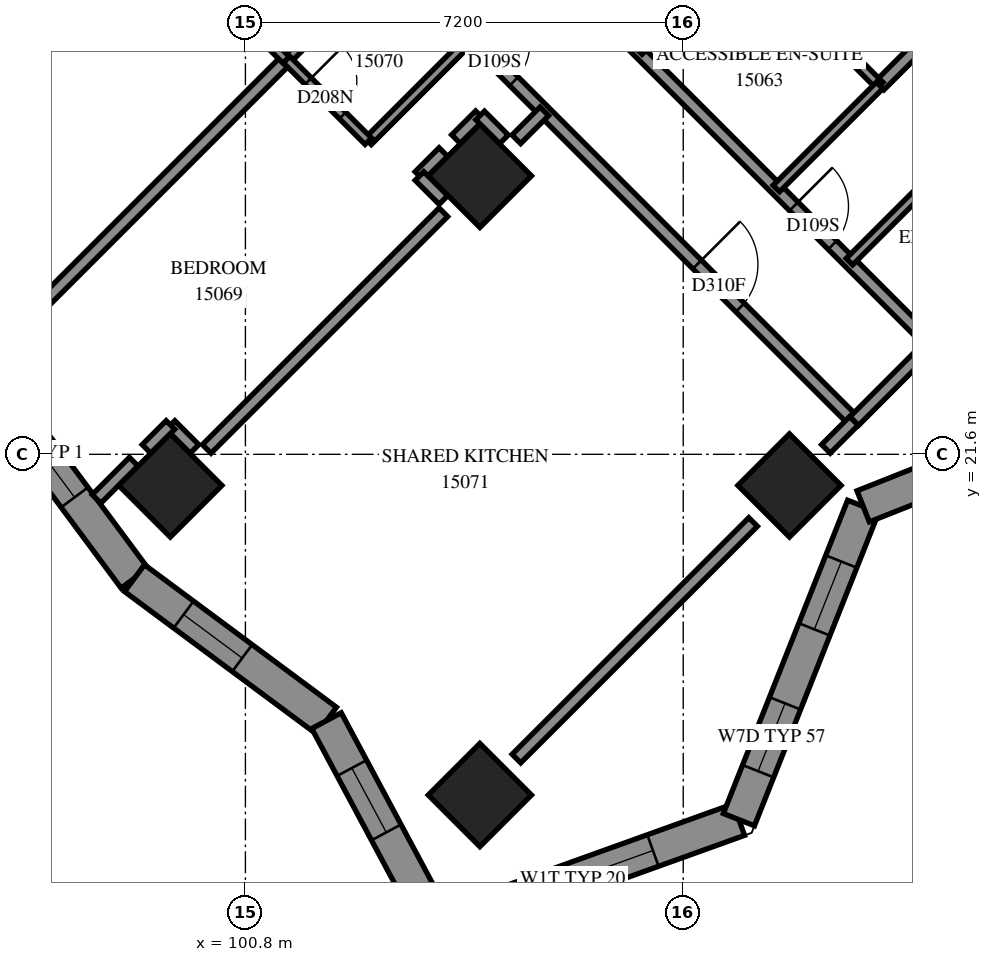
"""IFC4 building model, lengths in metres.
Left out: names, types, materials, properties, quantities, classifications, styles, units other than length and angle.
Written with IfcOpenShell. Run it as: python <this file> out.ifc"""

import sys

from ifc_helpers import new_model, si_unit, direction, frame, frame_2d, origin, origin_2d, place, context, subcontext, project, spatial, polyline, rectangle, outline, extrude, element, fill, save


model = new_model("IFC4")
c1 = context("Model", 3, precision=1e-05, world=origin(), true_north=direction((0.0, 1.0)))
c2 = subcontext(c1, "Body", "Model", "MODEL_VIEW")
j1 = project(units=[si_unit("LENGTHUNIT", "METRE"), si_unit("PLANEANGLEUNIT", "RADIAN")], contexts=[c1])
p1 = place(None, origin())
s1 = spatial("IfcSite", under=j1, at=p1, CompositionType="ELEMENT")
p2 = place(p1, origin())
s2 = spatial("IfcBuilding", under=s1, at=p2, CompositionType="ELEMENT")
p3 = place(p2, frame((0.0, 0.0, 57.6)))
s3 = spatial("IfcBuildingStorey", under=s2, at=p3, CompositionType="ELEMENT", Elevation=57.6)
for number, where, z_axis, x_axis in (
    (1, (104.656, 26.18, 0.0), (0.0, 0.0, 1.0), (0.707, -0.707, 0.0)),
    (2, (99.565, 21.088, 0.0), (0.0, 0.0, 1.0), (0.707, -0.707, 0.0)),
    (3, (109.747, 21.088, 0.0), (0.0, 0.0, 1.0), (0.707, -0.707, 0.0)),
    (4, (104.656, 15.997, 0.0), (0.0, 0.0, 1.0), (0.707, -0.707, 0.0)),
):
    element("IfcColumn", number, at=place(p3, frame(where, z_axis=z_axis, x_axis=x_axis)), inside=s3, PredefinedType="COLUMN", context=c2, shape_type="SweptSolid", body=[
        extrude(rectangle(XDim=1.2, YDim=1.2, at=origin_2d()), origin(), (0.0, 0.0, 1.0), 3.1),
    ])
p4 = place(p3, frame((103.957, 13.81, 0.0), z_axis=(0.0, 0.0, 1.0), x_axis=(0.9410697135, 0.3382126465, 0.0)))
e5 = element("IfcWall", 5, at=p4, inside=s3, PredefinedType="SOLIDWALL", context=c2, shape_type="SweptSolid", body=[
    extrude(outline(polyline([(-0.237, -0.275), (5.393, -0.275), (5.144, 0.275), (0.237, 0.275), (-0.237, -0.275)])), origin(), (0.0, 0.0, 1.0), 3.1),
])
p5 = place(p4, frame((0.967, 0.0, 0.5)))
e6 = element("IfcOpeningElement", 6, at=p5, cuts=e5, PredefinedType="OPENING", context=c2, shape_type="SweptSolid", body=[
    extrude(rectangle(XDim=2.8, YDim=2.45, at=frame_2d((1.4, 1.225))), frame((0.0, 0.285, 0.0), z_axis=(0.0, -1.0, 0.0), x_axis=(1.0, 0.0, 0.0)), (0.0, 0.0, 1.0), 0.57),
])
p6 = place(p3, frame((108.916, 15.592, 0.0), z_axis=(0.0, 0.0, 1.0), x_axis=(0.36873566, 0.929534299, 0.0)))
e7 = element("IfcWall", 7, at=p6, inside=s3, PredefinedType="SOLIDWALL", context=c2, shape_type="SweptSolid", body=[
    extrude(outline(polyline([(-0.124, -0.275), (5.424, -0.275), (5.661, 0.275), (0.124, 0.275), (-0.124, -0.275)])), origin(), (0.0, 0.0, 1.0), 3.1),
])
p7 = place(p6, frame((0.857, 0.0, 0.5)))
e8 = element("IfcOpeningElement", 8, at=p7, cuts=e7, PredefinedType="OPENING", context=c2, shape_type="SweptSolid", body=[
    extrude(rectangle(XDim=1.2, YDim=2.45, at=frame_2d((0.6, 1.225))), frame((0.0, 0.285, 0.0), z_axis=(0.0, -1.0, 0.0), x_axis=(1.0, 0.0, 0.0)), (0.0, 0.0, 1.0), 0.57),
])
p8 = place(p6, frame((3.366, 0.0, 0.5)))
e9 = element("IfcOpeningElement", 9, at=p8, cuts=e7, PredefinedType="OPENING", context=c2, shape_type="SweptSolid", body=[
    extrude(rectangle(XDim=1.2, YDim=2.45, at=frame_2d((0.6, 1.225))), frame((0.0, 0.285, 0.0), z_axis=(0.0, -1.0, 0.0), x_axis=(1.0, 0.0, 0.0)), (0.0, 0.0, 1.0), 0.57),
])
p9 = place(p3, frame((110.959, 20.744, 0.0), z_axis=(0.0, 0.0, 1.0), x_axis=(0.929534299, 0.36873566, 0.0)))
e10 = element("IfcWall", 10, at=p9, inside=s3, PredefinedType="SOLIDWALL", context=c2, shape_type="SweptSolid", body=[
    extrude(outline(polyline([(0.119, -0.275), (5.667, -0.275), (5.418, 0.275), (-0.119, 0.275), (0.119, -0.275)])), origin(), (0.0, 0.0, 1.0), 3.1),
])
p10 = place(p9, frame((1.226, 0.0, 0.5)))
e11 = element("IfcOpeningElement", 11, at=p10, cuts=e10, PredefinedType="OPENING", context=c2, shape_type="SweptSolid", body=[
    extrude(rectangle(XDim=2.8, YDim=2.45, at=frame_2d((1.4, 1.225))), frame((0.0, 0.285, 0.0), z_axis=(0.0, -1.0, 0.0), x_axis=(1.0, 0.0, 0.0)), (0.0, 0.0, 1.0), 0.57),
])
p11 = place(p3, frame((96.645, 22.704, 0.0), z_axis=(0.0, 0.0, 1.0), x_axis=(0.5960735241, -0.8029298561, 0.0)))
e12 = element("IfcWall", 12, at=p11, inside=s3, PredefinedType="SOLIDWALL", context=c2, shape_type="SweptSolid", body=[
    extrude(outline(polyline([(0.041, -0.275), (3.951, -0.275), (3.87, 0.275), (-0.041, 0.275), (0.041, -0.275)])), origin(), (0.0, 0.0, 1.0), 3.1),
])
p12 = place(p11, frame((0.456, 0.0, 0.7)))
e13 = element("IfcOpeningElement", 13, at=p12, cuts=e12, PredefinedType="OPENING", context=c2, shape_type="SweptSolid", body=[
    extrude(rectangle(XDim=1.8, YDim=2.2, at=frame_2d((0.9, 1.1))), frame((0.0, 0.285, 0.0), z_axis=(0.0, -1.0, 0.0), x_axis=(1.0, 0.0, 0.0)), (0.0, 0.0, 1.0), 0.57),
])
p13 = place(p3, frame((98.977, 19.564, 0.0), z_axis=(0.0, 0.0, 1.0), x_axis=(0.8029173948, -0.5960903095, 0.0)))
e14 = element("IfcWall", 14, at=p13, inside=s3, PredefinedType="SOLIDWALL", context=c2, shape_type="SweptSolid", body=[
    extrude(outline(polyline([(-0.041, -0.275), (3.87, -0.275), (3.994, 0.275), (0.041, 0.275), (-0.041, -0.275)])), origin(), (0.0, 0.0, 1.0), 3.1),
])
p14 = place(p13, frame((1.005, 0.0, 0.5)))
e15 = element("IfcOpeningElement", 15, at=p14, cuts=e14, PredefinedType="OPENING", context=c2, shape_type="SweptSolid", body=[
    extrude(rectangle(XDim=1.2, YDim=2.45, at=frame_2d((0.6, 1.225))), frame((0.0, 0.285, 0.0), z_axis=(0.0, -1.0, 0.0), x_axis=(1.0, 0.0, 0.0)), (0.0, 0.0, 1.0), 0.57),
])
p15 = place(p3, frame((102.133, 17.22, 0.0), z_axis=(0.0, 0.0, 1.0), x_axis=(0.4717368949, -0.8817393617, 0.0)))
e16 = element("IfcWall", 16, at=p15, inside=s3, PredefinedType="SOLIDWALL", context=c2, shape_type="SweptSolid", body=[
    extrude(outline(polyline([(0.062, -0.275), (4.104, -0.275), (3.629, 0.275), (-0.062, 0.275), (0.062, -0.275)])), origin(), (0.0, 0.0, 1.0), 3.1),
])
p16 = place(p15, frame((0.883, 0.0, 0.5)))
e17 = element("IfcOpeningElement", 17, at=p16, cuts=e16, PredefinedType="OPENING", context=c2, shape_type="SweptSolid", body=[
    extrude(rectangle(XDim=1.2, YDim=2.45, at=frame_2d((0.6, 1.225))), frame((0.0, 0.285, 0.0), z_axis=(0.0, -1.0, 0.0), x_axis=(1.0, 0.0, 0.0)), (0.0, 0.0, 1.0), 0.57),
])
p17 = place(p3, frame((101.825, 31.125, 0.0), z_axis=(0.0, 0.0, 1.0), x_axis=(0.7071067812, -0.7071067812, 0.0)))
e18 = element("IfcWall", 18, at=p17, inside=s3, PredefinedType="PARTITIONING", context=c2, shape_type="SweptSolid", body=[
    extrude(rectangle(XDim=12.7, YDim=0.2, at=frame_2d((6.35, 0.0))), origin(), (0.0, 0.0, 1.0), 3.1),
])
p18 = place(p17, frame((3.895, 0.0, 0.0)))
e19 = element("IfcOpeningElement", 19, at=p18, cuts=e18, PredefinedType="OPENING", context=c2, shape_type="SweptSolid", body=[
    extrude(rectangle(XDim=0.9, YDim=2.1, at=frame_2d((0.45, 1.05))), frame((0.0, 0.11, 0.0), z_axis=(0.0, -1.0, 0.0), x_axis=(1.0, 0.0, 0.0)), (0.0, 0.0, 1.0), 0.22),
])
p19 = place(p17, frame((9.056, 0.0, 0.0)))
e20 = element("IfcOpeningElement", 20, at=p19, cuts=e18, PredefinedType="OPENING", context=c2, shape_type="SweptSolid", body=[
    extrude(rectangle(XDim=1.0, YDim=2.1, at=frame_2d((0.5, 1.05))), frame((0.0, 0.11, 0.0), z_axis=(0.0, -1.0, 0.0), x_axis=(1.0, 0.0, 0.0)), (0.0, 0.0, 1.0), 0.22),
])
p20 = place(p3, frame((106.987, 28.509, 0.0), z_axis=(0.0, 0.0, 1.0), x_axis=(0.7071067812, -0.7071067812, 0.0)))
e21 = element("IfcWall", 21, at=p20, inside=s3, PredefinedType="PARTITIONING", context=c2, shape_type="SweptSolid", body=[
    extrude(rectangle(XDim=7.198, YDim=0.2, at=frame_2d((3.599, 0.0))), origin(), (0.0, 0.0, 1.0), 3.1),
])
p21 = place(p20, frame((4.004, 0.0, 0.0)))
e22 = element("IfcOpeningElement", 22, at=p21, cuts=e21, PredefinedType="OPENING", context=c2, shape_type="SweptSolid", body=[
    extrude(rectangle(XDim=0.9, YDim=2.1, at=frame_2d((0.45, 1.05))), frame((0.0, 0.11, 0.0), z_axis=(0.0, -1.0, 0.0), x_axis=(1.0, 0.0, 0.0)), (0.0, 0.0, 1.0), 0.22),
])
p22 = place(p3, frame((96.522, 23.138, 0.0), z_axis=(0.0, 0.0, 1.0), x_axis=(0.707113922, 0.7070996403, 0.0)))
e23 = element("IfcWall", 23, at=p22, inside=s3, PredefinedType="PARTITIONING", context=c2, shape_type="SweptSolid", body=[
    extrude(rectangle(XDim=7.002, YDim=0.2, at=frame_2d((3.501, 0.0))), origin(), (0.0, 0.0, 1.0), 3.1),
])
p23 = place(p3, frame((100.163, 21.689, 0.0), z_axis=(0.0, 0.0, 1.0), x_axis=(0.7071067812, 0.7071067812, 0.0)))
e24 = element("IfcWall", 24, at=p23, inside=s3, PredefinedType="PARTITIONING", context=c2, shape_type="SweptSolid", body=[
    extrude(rectangle(XDim=5.504, YDim=0.2, at=frame_2d((2.752, 0.0))), origin(), (0.0, 0.0, 1.0), 3.1),
])
p24 = place(p3, frame((105.257, 16.597, 0.0), z_axis=(0.0, 0.0, 1.0), x_axis=(0.7072884866, 0.706925029, 0.0)))
e25 = element("IfcWall", 25, at=p24, inside=s3, PredefinedType="PARTITIONING", context=c2, shape_type="SweptSolid", body=[
    extrude(rectangle(XDim=5.503, YDim=0.2, at=frame_2d((2.751, 0.0))), origin(), (0.0, 0.0, 1.0), 2.6),
])
p25 = place(p3, frame((111.231, 27.665, 0.0), z_axis=(0.0, 0.0, 1.0), x_axis=(0.7071067812, 0.7071067812, 0.0)))
e26 = element("IfcWall", 26, at=p25, inside=s3, PredefinedType="PARTITIONING", context=c2, shape_type="SweptSolid", body=[
    extrude(rectangle(XDim=4.55, YDim=0.2, at=frame_2d((2.275, 0.0))), origin(), (0.0, 0.0, 1.0), 3.1),
])
p26 = place(p3, frame((108.97, 29.928, 0.0), z_axis=(0.0, 0.0, 1.0), x_axis=(0.7067942478, -0.7074191764, 0.0)))
e27 = element("IfcWall", 27, at=p26, inside=s3, PredefinedType="PARTITIONING", context=c2, shape_type="SweptSolid", body=[
    extrude(rectangle(XDim=3.2, YDim=0.15, at=frame_2d((1.6, 0.0))), origin(), (0.0, 0.0, 1.0), 3.1),
])
p27 = place(p26, frame((1.148, 0.0, 0.0)))
e28 = element("IfcOpeningElement", 28, at=p27, cuts=e27, PredefinedType="OPENING", context=c2, shape_type="SweptSolid", body=[
    extrude(rectangle(XDim=0.8, YDim=2.1, at=frame_2d((0.4, 1.05))), frame((0.0, 0.085, 0.0), z_axis=(0.0, -1.0, 0.0), x_axis=(1.0, 0.0, 0.0)), (0.0, 0.0, 1.0), 0.17),
])
p28 = place(p3, frame((107.271, 28.231, 0.0), z_axis=(0.0, 0.0, 1.0), x_axis=(0.7071067812, 0.7071067812, 0.0)))
e29 = element("IfcWall", 29, at=p28, inside=s3, PredefinedType="PARTITIONING", context=c2, shape_type="SweptSolid", body=[
    extrude(rectangle(XDim=2.401, YDim=0.15, at=frame_2d((1.201, 0.0))), origin(), (0.0, 0.0, 1.0), 3.1),
])
for number, where, z_axis, x_axis in (
    (30, (101.477, 28.085, 0.0), (0.0, 0.0, 1.0), (0.707, 0.708, 0.0)),
    (31, (109.531, 25.971, 0.0), (0.0, 0.0, 1.0), (0.708, 0.707, 0.0)),
    (32, (110.734, 24.768, 0.0), (0.0, 0.0, 1.0), (0.708, 0.707, 0.0)),
):
    element("IfcWall", number, at=place(p3, frame(where, z_axis=z_axis, x_axis=x_axis)), inside=s3, PredefinedType="PARTITIONING", context=c2, shape_type="SweptSolid", body=[
        extrude(rectangle(XDim=2.4, YDim=0.15, at=frame_2d((1.2, 0.0))), origin(), (0.0, 0.0, 1.0), 3.1),
    ])
p29 = place(p3, frame((102.817, 26.747, 0.0), z_axis=(0.0, 0.0, 1.0), x_axis=(0.7071067812, 0.7071067812, 0.0)))
e33 = element("IfcWall", 33, at=p29, inside=s3, PredefinedType="PARTITIONING", context=c2, shape_type="SweptSolid", body=[
    extrude(rectangle(XDim=2.398, YDim=0.15, at=frame_2d((1.199, 0.0))), origin(), (0.0, 0.0, 1.0), 3.1),
])
p30 = place(p3, frame((100.127, 29.429, 0.0), z_axis=(0.0, 0.0, 1.0), x_axis=(0.7071067812, -0.7071067812, 0.0)))
e34 = element("IfcWall", 34, at=p30, inside=s3, PredefinedType="PARTITIONING", context=c2, shape_type="SweptSolid", body=[
    extrude(rectangle(XDim=1.901, YDim=0.15, at=frame_2d((0.95, 0.0))), origin(), (0.0, 0.0, 1.0), 3.1),
])
p31 = place(p30, frame((0.508, 0.0, 0.0)))
e35 = element("IfcOpeningElement", 35, at=p31, cuts=e34, PredefinedType="OPENING", context=c2, shape_type="SweptSolid", body=[
    extrude(rectangle(XDim=0.8, YDim=2.1, at=frame_2d((0.4, 1.05))), frame((0.0, 0.085, 0.0), z_axis=(0.0, -1.0, 0.0), x_axis=(1.0, 0.0, 0.0)), (0.0, 0.0, 1.0), 0.17),
])
p32 = place(p3, frame((101.477, 28.091, 0.0), z_axis=(0.0, 0.0, 1.0), x_axis=(0.7076330979, -0.7065800724, 0.0)))
e36 = element("IfcWall", 36, at=p32, inside=s3, PredefinedType="PARTITIONING", context=c2, shape_type="SweptSolid", body=[
    extrude(rectangle(XDim=1.899, YDim=0.15, at=frame_2d((0.95, 0.0))), origin(), (0.0, 0.0, 1.0), 3.1),
])
p33 = place(p32, frame((0.501, 0.0, 0.0)))
e37 = element("IfcOpeningElement", 37, at=p33, cuts=e36, PredefinedType="OPENING", context=c2, shape_type="SweptSolid", body=[
    extrude(rectangle(XDim=0.8, YDim=2.1, at=frame_2d((0.4, 1.05))), frame((0.0, 0.085, 0.0), z_axis=(0.0, -1.0, 0.0), x_axis=(1.0, 0.0, 0.0)), (0.0, 0.0, 1.0), 0.17),
])
p34 = place(p3, frame((110.811, 22.145, 0.0), z_axis=(0.0, 0.0, 1.0), x_axis=(0.7065510983, 0.7076620277, 0.0)))
e38 = element("IfcWall", 38, at=p34, inside=s3, PredefinedType="PARTITIONING", context=c2, shape_type="SweptSolid", body=[
    extrude(rectangle(XDim=1.8, YDim=0.2, at=frame_2d((0.9, 0.0))), origin(), (0.0, 0.0, 1.0), 2.6),
])
p35 = place(p3, frame((98.352, 20.867, 0.0), z_axis=(0.0, 0.0, 1.0), x_axis=(0.7071645631, 0.7070489945, 0.0)))
e39 = element("IfcWall", 39, at=p35, inside=s3, PredefinedType="PARTITIONING", context=c2, shape_type="SweptSolid", body=[
    extrude(rectangle(XDim=0.865, YDim=0.2, at=frame_2d((0.433, 0.0))), origin(), (0.0, 0.0, 1.0), 3.1),
])
p36 = place(p3, frame((110.347, 21.689, 0.0), z_axis=(0.0, 0.0, 1.0), x_axis=(0.7071067812, 0.7071067812, 0.0)))
e40 = element("IfcWall", 40, at=p36, inside=s3, PredefinedType="PARTITIONING", context=c2, shape_type="SweptSolid", body=[
    extrude(rectangle(XDim=0.65, YDim=0.2, at=frame_2d((0.325, 0.0))), origin(), (0.0, 0.0, 1.0), 2.6),
])
p37 = place(p3, frame((105.255, 26.781, 0.0), z_axis=(0.0, 0.0, 1.0), x_axis=(0.7071067812, 0.7071067812, 0.0)))
e41 = element("IfcWall", 41, at=p37, inside=s3, PredefinedType="PARTITIONING", context=c2, shape_type="SweptSolid", body=[
    extrude(rectangle(XDim=0.65, YDim=0.2, at=frame_2d((0.325, 0.0))), origin(), (0.0, 0.0, 1.0), 3.1),
])
for number, where, z_axis, x_axis in (
    (42, (99.568, 22.082, 0.0), (0.0, 0.0, 1.0), (0.707, -0.707, 0.0)),
    (43, (99.173, 21.689, 0.0), (0.0, 0.0, 1.0), (0.707, 0.707, 0.0)),
    (44, (103.661, 26.177, 0.0), (0.0, 0.0, 1.0), (0.707, 0.707, 0.0)),
    (45, (103.662, 26.177, 0.0), (0.0, 0.0, 1.0), (0.707, -0.707, 0.0)),
):
    element("IfcWall", number, at=place(p3, frame(where, z_axis=z_axis, x_axis=x_axis)), inside=s3, PredefinedType="PARTITIONING", context=c2, shape_type="SweptSolid", body=[
        extrude(rectangle(XDim=0.557, YDim=0.2, at=frame_2d((0.279, 0.0))), origin(), (0.0, 0.0, 1.0), 3.1),
    ])
p38 = place(p3, frame((104.263, 26.784, 0.0), z_axis=(0.0, 0.0, 1.0), x_axis=(0.7089037401, 0.705305244, 0.0)))
e46 = element("IfcWall", 46, at=p38, inside=s3, PredefinedType="PARTITIONING", context=c2, shape_type="SweptSolid", body=[
    extrude(rectangle(XDim=0.556, YDim=0.2, at=frame_2d((0.278, 0.0))), origin(), (0.0, 0.0, 1.0), 3.1),
])
p39 = place(p3, frame((104.66, 27.172, 0.0), z_axis=(0.0, 0.0, 1.0), x_axis=(0.7071067812, -0.7071067812, 0.0)))
e47 = element("IfcWall", 47, at=p39, inside=s3, PredefinedType="PARTITIONING", context=c2, shape_type="SweptSolid", body=[
    extrude(rectangle(XDim=0.554, YDim=0.2, at=frame_2d((0.277, 0.0))), origin(), (0.0, 0.0, 1.0), 3.1),
])
p40 = place(p5, origin())
e48 = element("IfcWindow", 48, at=p40, inside=s3, PartitioningType="SINGLE_PANEL", PredefinedType="WINDOW", context=c2, shape_type="SweptSolid", body=[
    extrude(rectangle(XDim=2.8, YDim=2.45, at=frame_2d((1.4, 1.225))), frame((0.0, 0.155, 0.0), z_axis=(0.0, -1.0, 0.0), x_axis=(1.0, 0.0, 0.0)), (0.0, 0.0, 1.0), 0.06),
])
fill(e6, e48)
p41 = place(p7, origin())
e49 = element("IfcWindow", 49, at=p41, inside=s3, PartitioningType="SINGLE_PANEL", PredefinedType="WINDOW", context=c2, shape_type="SweptSolid", body=[
    extrude(rectangle(XDim=1.2, YDim=2.45, at=frame_2d((0.6, 1.225))), frame((0.0, 0.155, 0.0), z_axis=(0.0, -1.0, 0.0), x_axis=(1.0, 0.0, 0.0)), (0.0, 0.0, 1.0), 0.06),
])
fill(e8, e49)
p42 = place(p8, origin())
e50 = element("IfcWindow", 50, at=p42, inside=s3, PartitioningType="SINGLE_PANEL", PredefinedType="WINDOW", context=c2, shape_type="SweptSolid", body=[
    extrude(rectangle(XDim=1.2, YDim=2.45, at=frame_2d((0.6, 1.225))), frame((0.0, 0.155, 0.0), z_axis=(0.0, -1.0, 0.0), x_axis=(1.0, 0.0, 0.0)), (0.0, 0.0, 1.0), 0.06),
])
fill(e9, e50)
p43 = place(p14, origin())
e51 = element("IfcWindow", 51, at=p43, inside=s3, PartitioningType="SINGLE_PANEL", PredefinedType="WINDOW", context=c2, shape_type="SweptSolid", body=[
    extrude(rectangle(XDim=1.2, YDim=2.45, at=frame_2d((0.6, 1.225))), frame((0.0, 0.155, 0.0), z_axis=(0.0, -1.0, 0.0), x_axis=(1.0, 0.0, 0.0)), (0.0, 0.0, 1.0), 0.06),
])
fill(e15, e51)
p44 = place(p16, origin())
e52 = element("IfcWindow", 52, at=p44, inside=s3, PartitioningType="SINGLE_PANEL", PredefinedType="WINDOW", context=c2, shape_type="SweptSolid", body=[
    extrude(rectangle(XDim=1.2, YDim=2.45, at=frame_2d((0.6, 1.225))), frame((0.0, 0.155, 0.0), z_axis=(0.0, -1.0, 0.0), x_axis=(1.0, 0.0, 0.0)), (0.0, 0.0, 1.0), 0.06),
])
fill(e17, e52)
p45 = place(p18, origin())
e53 = element("IfcDoor", 53, at=p45, inside=s3, OperationType="SINGLE_SWING_LEFT", PredefinedType="DOOR", context=c2, shape_type="SweptSolid", body=[
    extrude(rectangle(XDim=0.9, YDim=2.1, at=frame_2d((0.45, 1.05))), frame((0.0, 0.025, 0.0), z_axis=(0.0, -1.0, 0.0), x_axis=(1.0, 0.0, 0.0)), (0.0, 0.0, 1.0), 0.05),
])
fill(e19, e53)
p46 = place(p33, origin())
e54 = element("IfcDoor", 54, at=p46, inside=s3, OperationType="SINGLE_SWING_RIGHT", PredefinedType="DOOR", context=c2, shape_type="SweptSolid", body=[
    extrude(rectangle(XDim=0.8, YDim=2.1, at=frame_2d((0.4, 1.05))), frame((0.0, 0.025, 0.0), z_axis=(0.0, -1.0, 0.0), x_axis=(1.0, 0.0, 0.0)), (0.0, 0.0, 1.0), 0.05),
])
fill(e37, e54)
p47 = place(p19, origin())
e55 = element("IfcDoor", 55, at=p47, inside=s3, OperationType="SINGLE_SWING_RIGHT", PredefinedType="DOOR", context=c2, shape_type="SweptSolid", body=[
    extrude(rectangle(XDim=1.0, YDim=2.1, at=frame_2d((0.5, 1.05))), frame((0.0, 0.025, 0.0), z_axis=(0.0, -1.0, 0.0), x_axis=(1.0, 0.0, 0.0)), (0.0, 0.0, 1.0), 0.05),
])
fill(e20, e55)
p48 = place(p21, origin())
e56 = element("IfcDoor", 56, at=p48, inside=s3, OperationType="SINGLE_SWING_RIGHT", PredefinedType="DOOR", context=c2, shape_type="SweptSolid", body=[
    extrude(rectangle(XDim=0.9, YDim=2.1, at=frame_2d((0.45, 1.05))), frame((0.0, 0.025, 0.0), z_axis=(0.0, -1.0, 0.0), x_axis=(1.0, 0.0, 0.0)), (0.0, 0.0, 1.0), 0.05),
])
fill(e22, e56)
p49 = place(p12, origin())
e57 = element("IfcWindow", 57, at=p49, inside=s3, PartitioningType="SINGLE_PANEL", PredefinedType="WINDOW", context=c2, shape_type="SweptSolid", body=[
    extrude(rectangle(XDim=1.8, YDim=2.2, at=frame_2d((0.9, 1.1))), frame((0.0, 0.155, 0.0), z_axis=(0.0, -1.0, 0.0), x_axis=(1.0, 0.0, 0.0)), (0.0, 0.0, 1.0), 0.06),
])
fill(e13, e57)
save(model, sys.argv[1])
